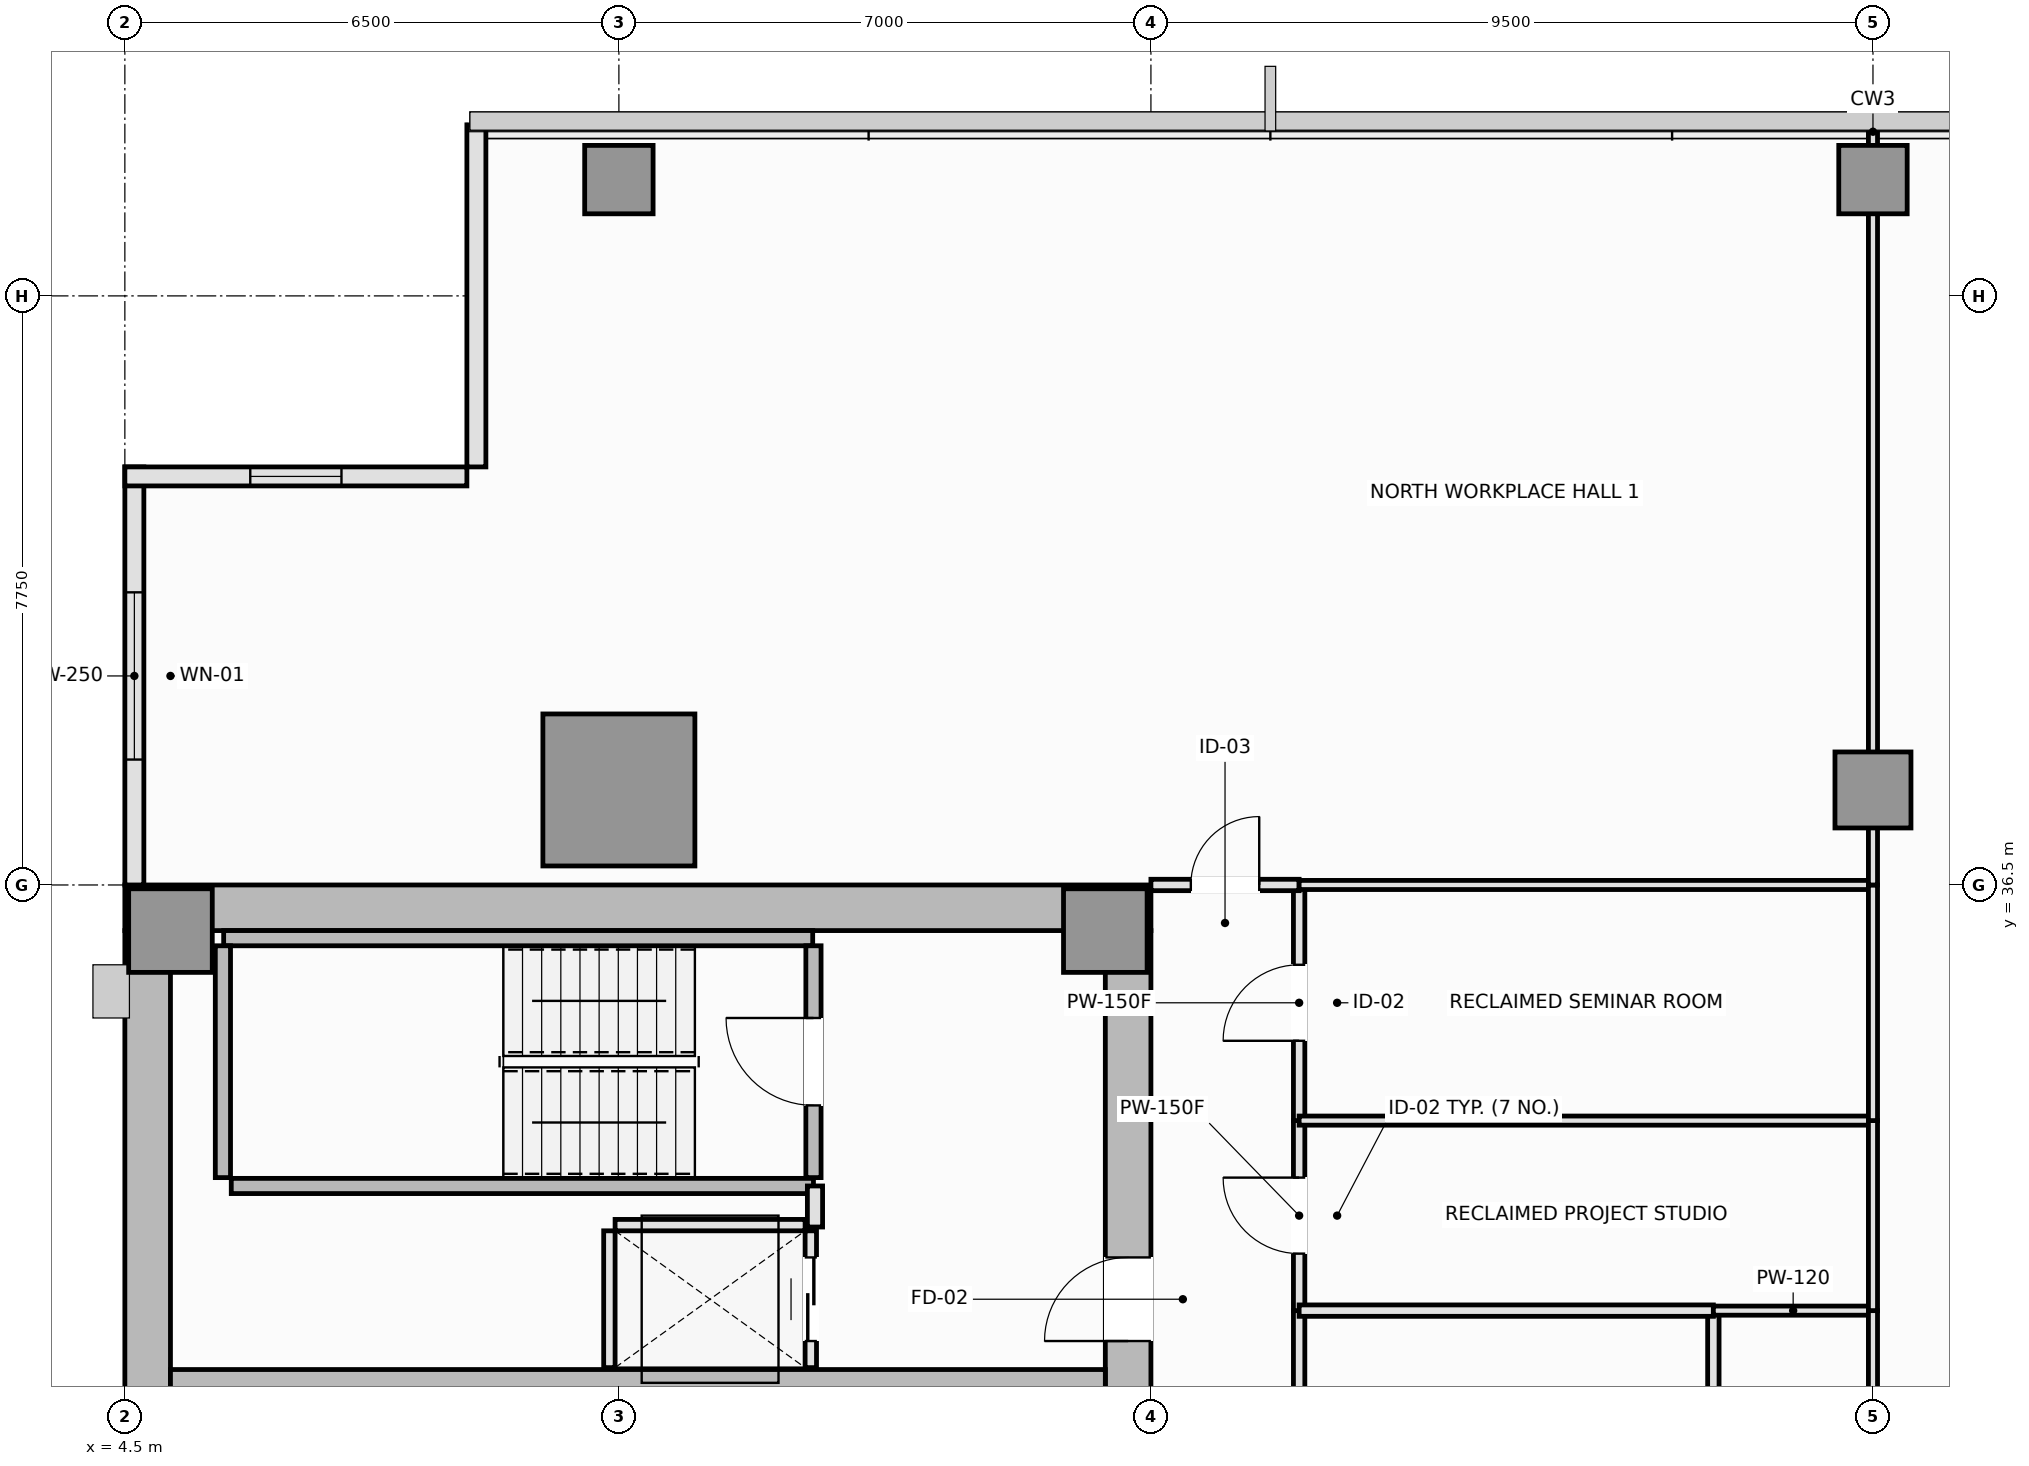
"""IFC4 building model, lengths in metres.
Left out: names, types, materials, properties, quantities, classifications, styles, units other than length and angle.
Written with IfcOpenShell. Run it as: python <this file> out.ifc"""

import sys

from ifc_helpers import new_model, si_unit, direction, frame, frame_2d, origin, origin_2d, place, context, subcontext, project, spatial, rectangle, extrude, element, fill, save


model = new_model("IFC4")
c1 = context("Model", 3, precision=1e-05, world=origin(), true_north=direction((0.0, 1.0)))
c2 = subcontext(c1, "Body", "Model", "MODEL_VIEW")
j1 = project(units=[si_unit("LENGTHUNIT", "METRE"), si_unit("PLANEANGLEUNIT", "RADIAN")], contexts=[c1])
p1 = place(None, origin())
s1 = spatial("IfcSite", under=j1, at=p1, CompositionType="ELEMENT")
p2 = place(p1, origin())
s2 = spatial("IfcBuilding", under=s1, at=p2, CompositionType="ELEMENT")
p3 = place(p2, frame((0.0, 0.0, 105.8)))
s3 = spatial("IfcBuildingStorey", under=s2, at=p3, CompositionType="ELEMENT", Elevation=105.8)
p4 = place(p3, frame((4.5, 36.2, 0.0), z_axis=(0.0, 0.0, 1.0), x_axis=(1.0, 0.0, 0.0)))
e1 = element("IfcWall", 1, at=p4, inside=s3, PredefinedType="SHEAR", context=c2, shape_type="SweptSolid", body=[
    extrude(rectangle(XDim=13.5, YDim=0.6, at=frame_2d((6.75, 0.0))), origin(), (0.0, 0.0, 1.0), 3.55),
])
p5 = place(p3, frame((4.8, 14.6, 0.0), z_axis=(0.0, 0.0, 1.0), x_axis=(0.0, 1.0, 0.0)))
e2 = element("IfcWall", 2, at=p5, inside=s3, PredefinedType="SHEAR", context=c2, shape_type="SweptSolid", body=[
    extrude(rectangle(XDim=21.3, YDim=0.6, at=frame_2d((10.65, 0.0))), origin(), (0.0, 0.0, 1.0), 3.55),
])
p6 = place(p3, frame((17.7, 27.05, 0.0), z_axis=(0.0, 0.0, 1.0), x_axis=(0.0, 1.0, 0.0)))
e3 = element("IfcWall", 3, at=p6, inside=s3, PredefinedType="SHEAR", context=c2, shape_type="SweptSolid", body=[
    extrude(rectangle(XDim=8.85, YDim=0.6, at=frame_2d((4.425, 0.0))), origin(), (0.0, 0.0, 1.0), 3.55),
])
p7 = place(p6, frame((3.45, 0.0, 0.0)))
e4 = element("IfcOpeningElement", 4, at=p7, cuts=e3, PredefinedType="OPENING", context=c2, shape_type="SweptSolid", body=[
    extrude(rectangle(XDim=1.1, YDim=2.15, at=frame_2d((0.55, 1.075))), frame((0.0, 0.31, 0.0), z_axis=(0.0, -1.0, 0.0), x_axis=(1.0, 0.0, 0.0)), (0.0, 0.0, 1.0), 0.62),
])
p8 = place(p3, frame((5.1, 29.9, 0.0), z_axis=(0.0, 0.0, 1.0), x_axis=(1.0, 0.0, 0.0)))
e5 = element("IfcWall", 5, at=p8, inside=s3, PredefinedType="SHEAR", context=c2, shape_type="SweptSolid", body=[
    extrude(rectangle(XDim=12.3, YDim=0.45, at=frame_2d((6.15, 0.0))), origin(), (0.0, 0.0, 1.0), 3.55),
])
for number, where, z_axis, x_axis in (
    (6, (5.1, 35.9, 0.0), (0.0, 0.0, 1.0), (1.0, 0.0, 0.0)),
    (7, (17.4, 35.9, 0.0), (0.0, 0.0, 1.0), (1.0, 0.0, 0.0)),
):
    element("IfcColumn", number, at=place(p3, frame(where, z_axis=z_axis, x_axis=x_axis)), inside=s3, PredefinedType="PILASTER", context=c2, shape_type="SweptSolid", body=[
        extrude(rectangle(XDim=1.1, YDim=1.1, at=origin_2d()), origin(), (0.0, 0.0, 1.0), 3.55),
    ])
p9 = place(p3, frame((11.0, 37.75, 0.0), z_axis=(0.0, 0.0, 1.0), x_axis=(1.0, 0.0, 0.0)))
e8 = element("IfcColumn", 8, at=p9, inside=s3, PredefinedType="COLUMN", context=c2, shape_type="SweptSolid", body=[
    extrude(rectangle(XDim=2.0, YDim=2.0, at=origin_2d()), origin(), (0.0, 0.0, 1.0), 3.55),
])
p10 = place(p3, frame((27.5, 37.75, 0.0), z_axis=(0.0, 0.0, 1.0), x_axis=(1.0, 0.0, 0.0)))
e9 = element("IfcColumn", 9, at=p10, inside=s3, PredefinedType="COLUMN", context=c2, shape_type="SweptSolid", body=[
    extrude(rectangle(XDim=1.0, YDim=1.0, at=origin_2d()), origin(), (0.0, 0.0, 1.0), 3.55),
])
for number, where, z_axis, x_axis in (
    (10, (11.0, 45.78, 0.0), (0.0, 0.0, 1.0), (1.0, 0.0, 0.0)),
    (11, (27.5, 45.78, 0.0), (0.0, 0.0, 1.0), (1.0, 0.0, 0.0)),
):
    element("IfcColumn", number, at=place(p3, frame(where, z_axis=z_axis, x_axis=x_axis)), inside=s3, PredefinedType="COLUMN", context=c2, shape_type="SweptSolid", body=[
        extrude(rectangle(XDim=0.9, YDim=0.9, at=origin_2d()), origin(), (0.0, 0.0, 1.0), 3.55),
    ])
p11 = place(p3, frame((4.625, 42.0, 0.0), z_axis=(0.0, 0.0, 1.0), x_axis=(0.0, -1.0, 0.0)))
e12 = element("IfcWall", 12, at=p11, inside=s3, PredefinedType="SOLIDWALL", context=c2, shape_type="SweptSolid", body=[
    extrude(rectangle(XDim=5.5, YDim=0.25, at=frame_2d((2.75, 0.0))), origin(), (0.0, 0.0, 1.0), 3.37),
])
p12 = place(p11, frame((1.65, 0.0, 0.9)))
e13 = element("IfcOpeningElement", 13, at=p12, cuts=e12, PredefinedType="OPENING", context=c2, shape_type="SweptSolid", body=[
    extrude(rectangle(XDim=2.2, YDim=1.8, at=frame_2d((1.1, 0.9))), frame((0.0, 0.135, 0.0), z_axis=(0.0, -1.0, 0.0), x_axis=(1.0, 0.0, 0.0)), (0.0, 0.0, 1.0), 0.27),
])
p13 = place(p3, frame((9.125, 46.5, 0.0), z_axis=(0.0, 0.0, 1.0), x_axis=(0.0, -1.0, 0.0)))
e14 = element("IfcWall", 14, at=p13, inside=s3, PredefinedType="SOLIDWALL", context=c2, shape_type="SweptSolid", body=[
    extrude(rectangle(XDim=4.5, YDim=0.25, at=frame_2d((2.25, 0.0))), origin(), (0.0, 0.0, 1.0), 3.37),
])
p14 = place(p3, frame((9.0, 41.875, 0.0), z_axis=(0.0, 0.0, 1.0), x_axis=(-1.0, 0.0, 0.0)))
e15 = element("IfcWall", 15, at=p14, inside=s3, PredefinedType="SOLIDWALL", context=c2, shape_type="SweptSolid", body=[
    extrude(rectangle(XDim=4.5, YDim=0.25, at=frame_2d((2.25, 0.0))), origin(), (0.0, 0.0, 1.0), 3.37),
])
p15 = place(p14, frame((1.65, 0.0, 0.9)))
e16 = element("IfcOpeningElement", 16, at=p15, cuts=e15, PredefinedType="OPENING", context=c2, shape_type="SweptSolid", body=[
    extrude(rectangle(XDim=1.2, YDim=1.8, at=frame_2d((0.6, 0.9))), frame((0.0, 0.135, 0.0), z_axis=(0.0, -1.0, 0.0), x_axis=(1.0, 0.0, 0.0)), (0.0, 0.0, 1.0), 0.27),
])
p16 = place(p3, frame((5.8, 35.8, 0.0), z_axis=(0.0, 0.0, 1.0), x_axis=(1.0, 0.0, 0.0)))
e17 = element("IfcWall", 17, at=p16, inside=s3, PredefinedType="SOLIDWALL", context=c2, shape_type="SweptSolid", body=[
    extrude(rectangle(XDim=7.75, YDim=0.2, at=frame_2d((3.875, 0.0))), origin(), (0.0, 0.0, 1.0), 3.55),
])
p17 = place(p3, frame((5.79, 32.65, 0.0), z_axis=(0.0, 0.0, 1.0), x_axis=(0.0, 1.0, 0.0)))
e18 = element("IfcWall", 18, at=p17, inside=s3, PredefinedType="SOLIDWALL", context=c2, shape_type="SweptSolid", body=[
    extrude(rectangle(XDim=3.05, YDim=0.2, at=frame_2d((1.525, 0.0))), origin(), (0.0, 0.0, 1.0), 3.55),
])
p18 = place(p3, frame((5.9, 32.54, 0.0), z_axis=(0.0, 0.0, 1.0), x_axis=(1.0, 0.0, 0.0)))
e19 = element("IfcWall", 19, at=p18, inside=s3, PredefinedType="SOLIDWALL", context=c2, shape_type="SweptSolid", body=[
    extrude(rectangle(XDim=7.66, YDim=0.2, at=frame_2d((3.83, 0.0))), origin(), (0.0, 0.0, 1.0), 3.55),
])
p19 = place(p3, frame((13.56, 32.65, 0.0), z_axis=(0.0, 0.0, 1.0), x_axis=(0.0, 1.0, 0.0)))
e20 = element("IfcWall", 20, at=p19, inside=s3, PredefinedType="SOLIDWALL", context=c2, shape_type="SweptSolid", body=[
    extrude(rectangle(XDim=3.05, YDim=0.2, at=frame_2d((1.525, 0.0))), origin(), (0.0, 0.0, 1.0), 3.55),
])
p20 = place(p19, frame((0.95, 0.0, 0.0)))
e21 = element("IfcOpeningElement", 21, at=p20, cuts=e20, PredefinedType="OPENING", context=c2, shape_type="SweptSolid", body=[
    extrude(rectangle(XDim=1.15, YDim=2.15, at=frame_2d((0.575, 1.075))), frame((0.0, 0.11, 0.0), z_axis=(0.0, -1.0, 0.0), x_axis=(1.0, 0.0, 0.0)), (0.0, 0.0, 1.0), 0.22),
])
p21 = place(p3, frame((10.95, 32.025, 0.0), z_axis=(0.0, 0.0, 1.0), x_axis=(1.0, 0.0, 0.0)))
e22 = element("IfcWall", 22, at=p21, inside=s3, PredefinedType="PARTITIONING", context=c2, shape_type="SweptSolid", body=[
    extrude(rectangle(XDim=2.5, YDim=0.15, at=frame_2d((1.25, 0.0))), origin(), (0.0, 0.0, 1.0), 3.37),
])
p22 = place(p3, frame((10.875, 30.15, 0.0), z_axis=(0.0, 0.0, 1.0), x_axis=(0.0, 1.0, 0.0)))
e23 = element("IfcWall", 23, at=p22, inside=s3, PredefinedType="PARTITIONING", context=c2, shape_type="SweptSolid", body=[
    extrude(rectangle(XDim=1.8, YDim=0.15, at=frame_2d((0.9, 0.0))), origin(), (0.0, 0.0, 1.0), 3.37),
])
p23 = place(p3, frame((13.525, 30.15, 0.0), z_axis=(0.0, 0.0, 1.0), x_axis=(0.0, 1.0, 0.0)))
e24 = element("IfcWall", 24, at=p23, inside=s3, PredefinedType="PARTITIONING", context=c2, shape_type="SweptSolid", body=[
    extrude(rectangle(XDim=1.8, YDim=0.15, at=frame_2d((0.9, 0.0))), origin(), (0.0, 0.0, 1.0), 3.37),
])
p24 = place(p23, frame((0.35, 0.0, 0.0)))
e25 = element("IfcOpeningElement", 25, at=p24, cuts=e24, PredefinedType="OPENING", context=c2, shape_type="SweptSolid", body=[
    extrude(rectangle(XDim=1.1, YDim=2.2, at=frame_2d((0.55, 1.1))), frame((0.0, 0.085, 0.0), z_axis=(0.0, -1.0, 0.0), x_axis=(1.0, 0.0, 0.0)), (0.0, 0.0, 1.0), 0.17),
])
p25 = place(p3, frame((13.58, 32.0, 0.0), z_axis=(0.0, 0.0, 1.0), x_axis=(0.0, 1.0, 0.0)))
e26 = element("IfcWall", 26, at=p25, inside=s3, PredefinedType="PARTITIONING", context=c2, shape_type="SweptSolid", body=[
    extrude(rectangle(XDim=0.54, YDim=0.2, at=frame_2d((0.27, 0.0))), origin(), (0.0, 0.0, 1.0), 3.37),
])
p26 = place(p3, frame((19.95, 27.9, 0.0), z_axis=(0.0, 0.0, 1.0), x_axis=(0.0, 1.0, 0.0)))
e27 = element("IfcWall", 27, at=p26, inside=s3, PredefinedType="PLUMBINGWALL", context=c2, shape_type="SweptSolid", body=[
    extrude(rectangle(XDim=3.0, YDim=0.15, at=frame_2d((1.5, 0.0))), origin(), (0.0, 0.0, 1.0), 3.37),
])
p27 = place(p26, frame((1.05, 0.0, 0.0)))
e28 = element("IfcOpeningElement", 28, at=p27, cuts=e27, PredefinedType="OPENING", context=c2, shape_type="SweptSolid", body=[
    extrude(rectangle(XDim=0.9, YDim=2.1, at=frame_2d((0.45, 1.05))), frame((0.0, 0.085, 0.0), z_axis=(0.0, -1.0, 0.0), x_axis=(1.0, 0.0, 0.0)), (0.0, 0.0, 1.0), 0.17),
])
p28 = place(p3, frame((19.95, 30.9, 0.0), z_axis=(0.0, 0.0, 1.0), x_axis=(0.0, 1.0, 0.0)))
e29 = element("IfcWall", 29, at=p28, inside=s3, PredefinedType="PARTITIONING", context=c2, shape_type="SweptSolid", body=[
    extrude(rectangle(XDim=2.5, YDim=0.15, at=frame_2d((1.25, 0.0))), origin(), (0.0, 0.0, 1.0), 3.37),
])
p29 = place(p28, frame((0.75, 0.0, 0.0)))
e30 = element("IfcOpeningElement", 30, at=p29, cuts=e29, PredefinedType="OPENING", context=c2, shape_type="SweptSolid", body=[
    extrude(rectangle(XDim=1.0, YDim=2.15, at=frame_2d((0.5, 1.075))), frame((0.0, 0.085, 0.0), z_axis=(0.0, -1.0, 0.0), x_axis=(1.0, 0.0, 0.0)), (0.0, 0.0, 1.0), 0.17),
])
p30 = place(p3, frame((19.95, 33.4, 0.0), z_axis=(0.0, 0.0, 1.0), x_axis=(0.0, 1.0, 0.0)))
e31 = element("IfcWall", 31, at=p30, inside=s3, PredefinedType="PARTITIONING", context=c2, shape_type="SweptSolid", body=[
    extrude(rectangle(XDim=3.1, YDim=0.15, at=frame_2d((1.55, 0.0))), origin(), (0.0, 0.0, 1.0), 3.37),
])
p31 = place(p30, frame((1.05, 0.0, 0.0)))
e32 = element("IfcOpeningElement", 32, at=p31, cuts=e31, PredefinedType="OPENING", context=c2, shape_type="SweptSolid", body=[
    extrude(rectangle(XDim=1.0, YDim=2.15, at=frame_2d((0.5, 1.075))), frame((0.0, 0.085, 0.0), z_axis=(0.0, -1.0, 0.0), x_axis=(1.0, 0.0, 0.0)), (0.0, 0.0, 1.0), 0.17),
])
p32 = place(p3, frame((18.0, 36.5, 0.0), z_axis=(0.0, 0.0, 1.0), x_axis=(1.0, 0.0, 0.0)))
e33 = element("IfcWall", 33, at=p32, inside=s3, PredefinedType="PARTITIONING", context=c2, shape_type="SweptSolid", body=[
    extrude(rectangle(XDim=1.95, YDim=0.15, at=frame_2d((0.975, 0.0))), origin(), (0.0, 0.0, 1.0), 3.37),
])
p33 = place(p32, frame((0.525, 0.0, 0.0)))
e34 = element("IfcOpeningElement", 34, at=p33, cuts=e33, PredefinedType="OPENING", context=c2, shape_type="SweptSolid", body=[
    extrude(rectangle(XDim=0.9, YDim=2.1, at=frame_2d((0.45, 1.05))), frame((0.0, 0.085, 0.0), z_axis=(0.0, -1.0, 0.0), x_axis=(1.0, 0.0, 0.0)), (0.0, 0.0, 1.0), 0.17),
])
p34 = place(p3, frame((25.4, 27.9, 0.0), z_axis=(0.0, 0.0, 1.0), x_axis=(0.0, 1.0, 0.0)))
e35 = element("IfcWall", 35, at=p34, inside=s3, PredefinedType="PLUMBINGWALL", context=c2, shape_type="SweptSolid", body=[
    extrude(rectangle(XDim=3.0, YDim=0.15, at=frame_2d((1.5, 0.0))), origin(), (0.0, 0.0, 1.0), 3.37),
])
p35 = place(p3, frame((19.95, 30.9, 0.0), z_axis=(0.0, 0.0, 1.0), x_axis=(1.0, 0.0, 0.0)))
e36 = element("IfcWall", 36, at=p35, inside=s3, PredefinedType="PLUMBINGWALL", context=c2, shape_type="SweptSolid", body=[
    extrude(rectangle(XDim=5.45, YDim=0.15, at=frame_2d((2.725, 0.0))), origin(), (0.0, 0.0, 1.0), 3.37),
])
p36 = place(p3, frame((25.4, 30.9, 0.0), z_axis=(0.0, 0.0, 1.0), x_axis=(1.0, 0.0, 0.0)))
e37 = element("IfcWall", 37, at=p36, inside=s3, PredefinedType="PARTITIONING", context=c2, shape_type="SweptSolid", body=[
    extrude(rectangle(XDim=2.1, YDim=0.12, at=frame_2d((1.05, 0.0))), origin(), (0.0, 0.0, 1.0), 3.37),
])
p37 = place(p3, frame((27.5, 22.5, 0.0), z_axis=(0.0, 0.0, 1.0), x_axis=(0.0, 1.0, 0.0)))
e38 = element("IfcWall", 38, at=p37, inside=s3, PredefinedType="PARTITIONING", context=c2, shape_type="SweptSolid", body=[
    extrude(rectangle(XDim=8.4, YDim=0.12, at=frame_2d((4.2, 0.0))), origin(), (0.0, 0.0, 1.0), 3.37),
])
p38 = place(p3, frame((19.95, 33.4, 0.0), z_axis=(0.0, 0.0, 1.0), x_axis=(1.0, 0.0, 0.0)))
e39 = element("IfcWall", 39, at=p38, inside=s3, PredefinedType="PARTITIONING", context=c2, shape_type="SweptSolid", body=[
    extrude(rectangle(XDim=7.55, YDim=0.12, at=frame_2d((3.775, 0.0))), origin(), (0.0, 0.0, 1.0), 3.37),
])
p39 = place(p3, frame((27.5, 30.9, 0.0), z_axis=(0.0, 0.0, 1.0), x_axis=(0.0, 1.0, 0.0)))
e40 = element("IfcWall", 40, at=p39, inside=s3, PredefinedType="PARTITIONING", context=c2, shape_type="SweptSolid", body=[
    extrude(rectangle(XDim=2.5, YDim=0.12, at=frame_2d((1.25, 0.0))), origin(), (0.0, 0.0, 1.0), 3.37),
])
p40 = place(p3, frame((19.95, 36.5, 0.0), z_axis=(0.0, 0.0, 1.0), x_axis=(1.0, 0.0, 0.0)))
e41 = element("IfcWall", 41, at=p40, inside=s3, PredefinedType="PARTITIONING", context=c2, shape_type="SweptSolid", body=[
    extrude(rectangle(XDim=7.55, YDim=0.12, at=frame_2d((3.775, 0.0))), origin(), (0.0, 0.0, 1.0), 3.37),
])
p41 = place(p3, frame((27.5, 33.4, 0.0), z_axis=(0.0, 0.0, 1.0), x_axis=(0.0, 1.0, 0.0)))
e42 = element("IfcWall", 42, at=p41, inside=s3, PredefinedType="PARTITIONING", context=c2, shape_type="SweptSolid", body=[
    extrude(rectangle(XDim=3.1, YDim=0.12, at=frame_2d((1.55, 0.0))), origin(), (0.0, 0.0, 1.0), 3.37),
])
p42 = place(p3, frame((27.5, 36.5, 0.0), z_axis=(0.0, 0.0, 1.0), x_axis=(0.0, 1.0, 0.0)))
e43 = element("IfcWall", 43, at=p42, inside=s3, PredefinedType="PARTITIONING", context=c2, shape_type="SweptSolid", body=[
    extrude(rectangle(XDim=9.99, YDim=0.12, at=frame_2d((4.995, 0.0))), origin(), (0.0, 0.0, 1.0), 2.87),
])
p43 = place(p12, origin())
e44 = element("IfcWindow", 44, at=p43, inside=s3, PartitioningType="SINGLE_PANEL", PredefinedType="WINDOW", context=c2, shape_type="SweptSolid", body=[
    extrude(rectangle(XDim=2.2, YDim=1.8, at=frame_2d((1.1, 0.9))), frame((0.0, 0.03, 0.0), z_axis=(0.0, -1.0, 0.0), x_axis=(1.0, 0.0, 0.0)), (0.0, 0.0, 1.0), 0.06),
])
fill(e13, e44)
p44 = place(p15, origin())
e45 = element("IfcWindow", 45, at=p44, inside=s3, PartitioningType="SINGLE_PANEL", PredefinedType="WINDOW", context=c2, shape_type="SweptSolid", body=[
    extrude(rectangle(XDim=1.2, YDim=1.8, at=frame_2d((0.6, 0.9))), frame((0.0, 0.03, 0.0), z_axis=(0.0, -1.0, 0.0), x_axis=(1.0, 0.0, 0.0)), (0.0, 0.0, 1.0), 0.06),
])
fill(e16, e45)
p45 = place(p20, origin())
e46 = element("IfcDoor", 46, at=p45, inside=s3, OperationType="SINGLE_SWING_RIGHT", PredefinedType="DOOR", context=c2, shape_type="SweptSolid", body=[
    extrude(rectangle(XDim=1.15, YDim=2.15, at=frame_2d((0.575, 1.075))), frame((0.0, 0.025, 0.0), z_axis=(0.0, -1.0, 0.0), x_axis=(1.0, 0.0, 0.0)), (0.0, 0.0, 1.0), 0.05),
])
fill(e21, e46)
p46 = place(p24, origin())
e47 = element("IfcDoor", 47, at=p46, inside=s3, OperationType="DOUBLE_DOOR_SLIDING", PredefinedType="DOOR", context=c2, shape_type="SweptSolid", body=[
    extrude(rectangle(XDim=1.1, YDim=2.2, at=frame_2d((0.55, 1.1))), frame((0.0, 0.025, 0.0), z_axis=(0.0, -1.0, 0.0), x_axis=(1.0, 0.0, 0.0)), (0.0, 0.0, 1.0), 0.05),
])
fill(e25, e47)
p47 = place(p7, origin())
e48 = element("IfcDoor", 48, at=p47, inside=s3, OperationType="SINGLE_SWING_LEFT", PredefinedType="DOOR", context=c2, shape_type="SweptSolid", body=[
    extrude(rectangle(XDim=1.1, YDim=2.15, at=frame_2d((0.55, 1.075))), frame((0.0, 0.025, 0.0), z_axis=(0.0, -1.0, 0.0), x_axis=(1.0, 0.0, 0.0)), (0.0, 0.0, 1.0), 0.05),
])
fill(e4, e48)
p48 = place(p29, origin())
e49 = element("IfcDoor", 49, at=p48, inside=s3, OperationType="SINGLE_SWING_RIGHT", PredefinedType="DOOR", context=c2, shape_type="SweptSolid", body=[
    extrude(rectangle(XDim=1.0, YDim=2.15, at=frame_2d((0.5, 1.075))), frame((0.0, 0.025, 0.0), z_axis=(0.0, -1.0, 0.0), x_axis=(1.0, 0.0, 0.0)), (0.0, 0.0, 1.0), 0.05),
])
fill(e30, e49)
p49 = place(p31, origin())
e50 = element("IfcDoor", 50, at=p49, inside=s3, OperationType="SINGLE_SWING_LEFT", PredefinedType="DOOR", context=c2, shape_type="SweptSolid", body=[
    extrude(rectangle(XDim=1.0, YDim=2.15, at=frame_2d((0.5, 1.075))), frame((0.0, 0.025, 0.0), z_axis=(0.0, -1.0, 0.0), x_axis=(1.0, 0.0, 0.0)), (0.0, 0.0, 1.0), 0.05),
])
fill(e32, e50)
p50 = place(p33, origin())
e51 = element("IfcDoor", 51, at=p50, inside=s3, OperationType="SINGLE_SWING_RIGHT", PredefinedType="DOOR", context=c2, shape_type="SweptSolid", body=[
    extrude(rectangle(XDim=0.9, YDim=2.1, at=frame_2d((0.45, 1.05))), frame((0.0, 0.025, 0.0), z_axis=(0.0, -1.0, 0.0), x_axis=(1.0, 0.0, 0.0)), (0.0, 0.0, 1.0), 0.05),
])
fill(e34, e51)
save(model, sys.argv[1])
